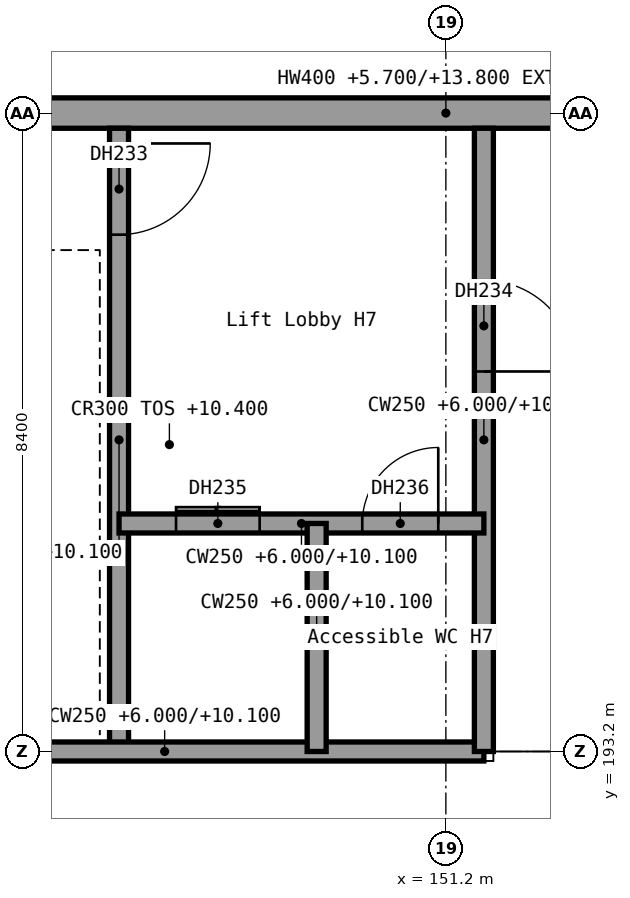
"""IFC4 building model, lengths in metres.
Left out: names, types, materials, properties, quantities, classifications, styles, units other than length and angle.
Written with IfcOpenShell. Run it as: python <this file> out.ifc"""

import sys

from ifc_helpers import new_model, si_unit, direction, frame, frame_2d, origin, place, context, subcontext, project, spatial, rectangle, extrude, element, fill, save


model = new_model("IFC4")
c1 = context("Model", 3, precision=1e-05, world=origin(), true_north=direction((0.0, 1.0)))
c2 = subcontext(c1, "Body", "Model", "MODEL_VIEW")
j1 = project(units=[si_unit("LENGTHUNIT", "METRE"), si_unit("PLANEANGLEUNIT", "RADIAN")], contexts=[c1])
p1 = place(None, origin())
s1 = spatial("IfcSite", under=j1, at=p1, CompositionType="ELEMENT")
p2 = place(p1, origin())
s2 = spatial("IfcBuilding", under=s1, at=p2, CompositionType="ELEMENT")
p3 = place(p2, frame((0.0, 0.0, 6.0)))
s3 = spatial("IfcBuildingStorey", under=s2, at=p3, CompositionType="ELEMENT", Elevation=6.0)
p4 = place(p3, frame((143.3, 201.6, -0.3), z_axis=(0.0, 0.0, 1.0), x_axis=(1.0, 0.0, 0.0)))
e1 = element("IfcWall", 1, at=p4, inside=s3, PredefinedType="STANDARD", context=c2, shape_type="SweptSolid", body=[
    extrude(rectangle(XDim=15.8, YDim=0.4, at=frame_2d((7.9, 0.0))), origin(), (0.0, 0.0, 1.0), 8.1),
])
p5 = place(p3, frame((146.9, 201.4, 0.0), z_axis=(0.0, 0.0, 1.0), x_axis=(0.0, -1.0, 0.0)))
e2 = element("IfcWall", 2, at=p5, inside=s3, PredefinedType="SHEAR", context=c2, shape_type="SweptSolid", body=[
    extrude(rectangle(XDim=8.2, YDim=0.25, at=frame_2d((4.1, 0.0))), origin(), (0.0, 0.0, 1.0), 4.1),
])
p6 = place(p5, frame((0.2, 0.0, 0.0)))
e3 = element("IfcOpeningElement", 3, at=p6, cuts=e2, PredefinedType="OPENING", context=c2, shape_type="SweptSolid", body=[
    extrude(rectangle(XDim=1.2, YDim=2.1, at=frame_2d((0.6, 1.05))), frame((0.0, 0.125, 0.0), z_axis=(0.0, -1.0, 0.0), x_axis=(1.0, 0.0, 0.0)), (0.0, 0.0, 1.0), 0.25),
])
p7 = place(p3, frame((143.3, 193.2, 0.0), z_axis=(0.0, 0.0, 1.0), x_axis=(1.0, 0.0, 0.0)))
e4 = element("IfcWall", 4, at=p7, inside=s3, PredefinedType="SHEAR", context=c2, shape_type="SweptSolid", body=[
    extrude(rectangle(XDim=8.4, YDim=0.25, at=frame_2d((4.2, 0.0))), origin(), (0.0, 0.0, 1.0), 4.1),
])
p8 = place(p3, frame((151.7, 201.4, 0.0), z_axis=(0.0, 0.0, 1.0), x_axis=(0.0, -1.0, 0.0)))
e5 = element("IfcWall", 5, at=p8, inside=s3, PredefinedType="SHEAR", context=c2, shape_type="SweptSolid", body=[
    extrude(rectangle(XDim=8.2, YDim=0.25, at=frame_2d((4.1, 0.0))), origin(), (0.0, 0.0, 1.0), 4.1),
])
p9 = place(p8, frame((2.0, 0.0, 0.0)))
e6 = element("IfcOpeningElement", 6, at=p9, cuts=e5, PredefinedType="OPENING", context=c2, shape_type="SweptSolid", body=[
    extrude(rectangle(XDim=1.2, YDim=2.1, at=frame_2d((0.6, 1.05))), frame((0.0, 0.125, 0.0), z_axis=(0.0, -1.0, 0.0), x_axis=(1.0, 0.0, 0.0)), (0.0, 0.0, 1.0), 0.25),
])
p10 = place(p3, frame((146.9, 196.2, 0.0), z_axis=(0.0, 0.0, 1.0), x_axis=(1.0, 0.0, 0.0)))
e7 = element("IfcWall", 7, at=p10, inside=s3, PredefinedType="SHEAR", context=c2, shape_type="SweptSolid", body=[
    extrude(rectangle(XDim=4.8, YDim=0.25, at=frame_2d((2.4, 0.0))), origin(), (0.0, 0.0, 1.0), 4.1),
])
p11 = place(p10, frame((0.75, 0.0, 0.0)))
e8 = element("IfcOpeningElement", 8, at=p11, cuts=e7, PredefinedType="OPENING", context=c2, shape_type="SweptSolid", body=[
    extrude(rectangle(XDim=1.1, YDim=2.1, at=frame_2d((0.55, 1.05))), frame((0.0, 0.125, 0.0), z_axis=(0.0, -1.0, 0.0), x_axis=(1.0, 0.0, 0.0)), (0.0, 0.0, 1.0), 0.25),
])
p12 = place(p10, frame((3.2, 0.0, 0.0)))
e9 = element("IfcOpeningElement", 9, at=p12, cuts=e7, PredefinedType="OPENING", context=c2, shape_type="SweptSolid", body=[
    extrude(rectangle(XDim=1.0, YDim=2.1, at=frame_2d((0.5, 1.05))), frame((0.0, 0.125, 0.0), z_axis=(0.0, -1.0, 0.0), x_axis=(1.0, 0.0, 0.0)), (0.0, 0.0, 1.0), 0.25),
])
p13 = place(p3, frame((149.5, 196.2, 0.0), z_axis=(0.0, 0.0, 1.0), x_axis=(0.0, -1.0, 0.0)))
e10 = element("IfcWall", 10, at=p13, inside=s3, PredefinedType="SHEAR", context=c2, shape_type="SweptSolid", body=[
    extrude(rectangle(XDim=3.0, YDim=0.25, at=frame_2d((1.5, 0.0))), origin(), (0.0, 0.0, 1.0), 4.1),
])
p14 = place(p6, origin())
e11 = element("IfcDoor", 11, at=p14, inside=s3, OperationType="SINGLE_SWING_LEFT", PredefinedType="DOOR", context=c2, shape_type="SweptSolid", body=[
    extrude(rectangle(XDim=1.2, YDim=2.1, at=frame_2d((0.6, 1.05))), frame((0.0, 0.025, 0.0), z_axis=(0.0, -1.0, 0.0), x_axis=(1.0, 0.0, 0.0)), (0.0, 0.0, 1.0), 0.05),
])
fill(e3, e11)
p15 = place(p9, origin())
e12 = element("IfcDoor", 12, at=p15, inside=s3, OperationType="SINGLE_SWING_LEFT", PredefinedType="DOOR", context=c2, shape_type="SweptSolid", body=[
    extrude(rectangle(XDim=1.2, YDim=2.1, at=frame_2d((0.6, 1.05))), frame((0.0, 0.025, 0.0), z_axis=(0.0, -1.0, 0.0), x_axis=(1.0, 0.0, 0.0)), (0.0, 0.0, 1.0), 0.05),
])
fill(e6, e12)
p16 = place(p11, origin())
e13 = element("IfcDoor", 13, at=p16, inside=s3, OperationType="DOUBLE_DOOR_SLIDING", PredefinedType="DOOR", context=c2, shape_type="SweptSolid", body=[
    extrude(rectangle(XDim=1.1, YDim=2.1, at=frame_2d((0.55, 1.05))), frame((0.0, 0.025, 0.0), z_axis=(0.0, -1.0, 0.0), x_axis=(1.0, 0.0, 0.0)), (0.0, 0.0, 1.0), 0.05),
])
fill(e8, e13)
p17 = place(p12, origin())
e14 = element("IfcDoor", 14, at=p17, inside=s3, OperationType="SINGLE_SWING_RIGHT", PredefinedType="DOOR", context=c2, shape_type="SweptSolid", body=[
    extrude(rectangle(XDim=1.0, YDim=2.1, at=frame_2d((0.5, 1.05))), frame((0.0, 0.025, 0.0), z_axis=(0.0, -1.0, 0.0), x_axis=(1.0, 0.0, 0.0)), (0.0, 0.0, 1.0), 0.05),
])
fill(e9, e14)
save(model, sys.argv[1])
